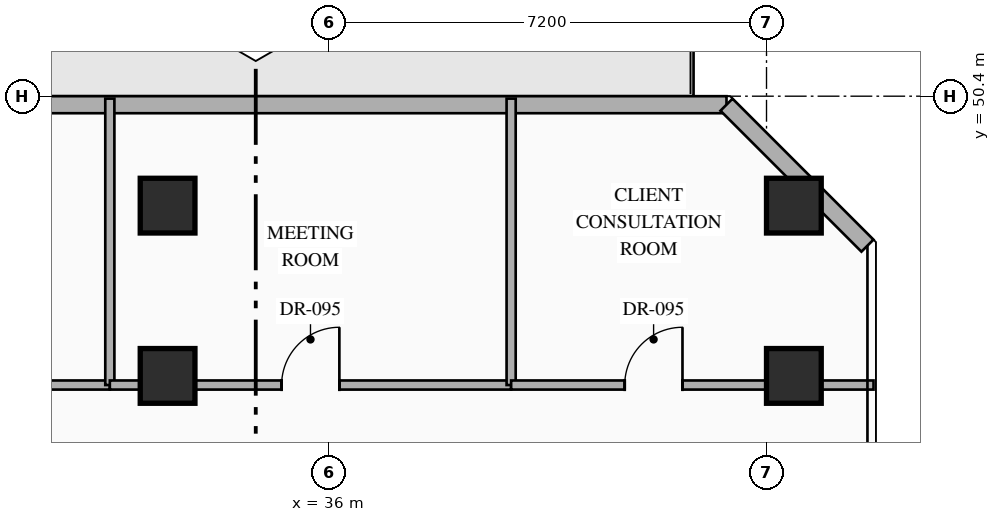
"""IFC4 building model, lengths in metres.
Left out: names, types, materials, properties, quantities, classifications, styles, units other than length and angle.
Written with IfcOpenShell. Run it as: python <this file> out.ifc"""

import sys

from ifc_helpers import new_model, si_unit, direction, frame, frame_2d, origin, origin_2d, place, context, subcontext, project, spatial, rectangle, hollow_rectangle, extrude, element, fill, save


model = new_model("IFC4")
c1 = context("Model", 3, precision=1e-05, world=origin(), true_north=direction((0.0, 1.0)))
c2 = subcontext(c1, "Body", "Model", "MODEL_VIEW")
j1 = project(units=[si_unit("LENGTHUNIT", "METRE"), si_unit("PLANEANGLEUNIT", "RADIAN")], contexts=[c1])
p1 = place(None, origin())
s1 = spatial("IfcSite", under=j1, at=p1, CompositionType="ELEMENT")
p2 = place(p1, origin())
s2 = spatial("IfcBuilding", under=s1, at=p2, CompositionType="ELEMENT")
p3 = place(p2, frame((0.0, 0.0, 112.05)))
s3 = spatial("IfcBuildingStorey", under=s2, at=p3, CompositionType="ELEMENT", Elevation=112.05)
for number, where, z_axis, x_axis in (
    (1, (33.35, 45.8, 0.0), (0.0, 0.0, 1.0), (1.0, 0.0, 0.0)),
    (2, (43.65, 45.8, 0.0), (0.0, 0.0, 1.0), (1.0, 0.0, 0.0)),
    (3, (33.35, 48.6, 0.0), (0.0, 0.0, 1.0), (1.0, 0.0, 0.0)),
    (4, (43.65, 48.6, 0.0), (0.0, 0.0, 1.0), (1.0, 0.0, 0.0)),
):
    element("IfcColumn", number, at=place(p3, frame(where, z_axis=z_axis, x_axis=x_axis)), inside=s3, PredefinedType="COLUMN", context=c2, shape_type="SweptSolid", body=[
        extrude(hollow_rectangle(XDim=0.9, YDim=0.9, WallThickness=0.036, at=origin_2d()), origin(), (0.0, 0.0, 1.0), 3.6),
    ])
p4 = place(p3, frame((12.058, 50.26, 0.0), z_axis=(0.0, 0.0, 1.0), x_axis=(1.0, 0.0, 0.0)))
e5 = element("IfcWall", 5, at=p4, inside=s3, PredefinedType="STANDARD", context=c2, shape_type="SweptSolid", body=[
    extrude(rectangle(XDim=30.484, YDim=0.28, at=frame_2d((15.242, 0.0))), origin(), (0.0, 0.0, 1.0), 3.35),
])
p5 = place(p4, frame((10.424, 0.0, 0.0)))
e6 = element("IfcOpeningElement", 6, at=p5, cuts=e5, PredefinedType="OPENING", context=c2, shape_type="SweptSolid", body=[
    extrude(rectangle(XDim=1.1, YDim=2.2, at=frame_2d((0.55, 1.1))), frame((0.0, 0.15, 0.0), z_axis=(0.0, -1.0, 0.0), x_axis=(1.0, 0.0, 0.0)), (0.0, 0.0, 1.0), 0.3),
])
p6 = place(p3, frame((42.542, 50.26, 0.0), z_axis=(0.0, 0.0, 1.0), x_axis=(0.707106781187, -0.707106781187, 0.0)))
e7 = element("IfcWall", 7, at=p6, inside=s3, PredefinedType="STANDARD", context=c2, shape_type="SweptSolid", body=[
    extrude(rectangle(XDim=3.278, YDim=0.28, at=frame_2d((1.639, 0.0))), origin(), (0.0, 0.0, 1.0), 3.35),
])
p7 = place(p3, frame((26.2, 45.65, 0.0), z_axis=(0.0, 0.0, 1.0), x_axis=(1.0, 0.0, 0.0)))
e8 = element("IfcWall", 8, at=p7, inside=s3, PredefinedType="PARTITIONING", context=c2, shape_type="SweptSolid", body=[
    extrude(rectangle(XDim=6.2, YDim=0.15, at=frame_2d((3.1, 0.0))), origin(), (0.0, 0.0, 1.0), 2.695),
])
p8 = place(p7, frame((2.625, 0.0, 0.0)))
e9 = element("IfcOpeningElement", 9, at=p8, cuts=e8, PredefinedType="OPENING", context=c2, shape_type="SweptSolid", body=[
    extrude(rectangle(XDim=0.95, YDim=2.15, at=frame_2d((0.475, 1.075))), frame((0.0, 0.085, 0.0), z_axis=(0.0, -1.0, 0.0), x_axis=(1.0, 0.0, 0.0)), (0.0, 0.0, 1.0), 0.17),
])
p9 = place(p3, frame((32.4, 45.65, 0.0), z_axis=(0.0, 0.0, 1.0), x_axis=(0.0, 1.0, 0.0)))
e10 = element("IfcWall", 10, at=p9, inside=s3, PredefinedType="PARTITIONING", context=c2, shape_type="SweptSolid", body=[
    extrude(rectangle(XDim=4.71, YDim=0.15, at=frame_2d((2.355, 0.0))), origin(), (0.0, 0.0, 1.0), 3.35),
])
p10 = place(p3, frame((32.4, 45.65, 0.0), z_axis=(0.0, 0.0, 1.0), x_axis=(1.0, 0.0, 0.0)))
e11 = element("IfcWall", 11, at=p10, inside=s3, PredefinedType="PARTITIONING", context=c2, shape_type="SweptSolid", body=[
    extrude(rectangle(XDim=6.6, YDim=0.15, at=frame_2d((3.3, 0.0))), origin(), (0.0, 0.0, 1.0), 2.695),
])
p11 = place(p10, frame((2.825, 0.0, 0.0)))
e12 = element("IfcOpeningElement", 12, at=p11, cuts=e11, PredefinedType="OPENING", context=c2, shape_type="SweptSolid", body=[
    extrude(rectangle(XDim=0.95, YDim=2.15, at=frame_2d((0.475, 1.075))), frame((0.0, 0.085, 0.0), z_axis=(0.0, -1.0, 0.0), x_axis=(1.0, 0.0, 0.0)), (0.0, 0.0, 1.0), 0.17),
])
p12 = place(p3, frame((39.0, 45.65, 0.0), z_axis=(0.0, 0.0, 1.0), x_axis=(0.0, 1.0, 0.0)))
e13 = element("IfcWall", 13, at=p12, inside=s3, PredefinedType="PARTITIONING", context=c2, shape_type="SweptSolid", body=[
    extrude(rectangle(XDim=4.71, YDim=0.15, at=frame_2d((2.355, 0.0))), origin(), (0.0, 0.0, 1.0), 3.35),
])
p13 = place(p3, frame((39.0, 45.65, 0.0), z_axis=(0.0, 0.0, 1.0), x_axis=(1.0, 0.0, 0.0)))
e14 = element("IfcWall", 14, at=p13, inside=s3, PredefinedType="PARTITIONING", context=c2, shape_type="SweptSolid", body=[
    extrude(rectangle(XDim=5.96, YDim=0.15, at=frame_2d((2.98, 0.0))), origin(), (0.0, 0.0, 1.0), 2.695),
])
p14 = place(p13, frame((1.868, 0.0, 0.0)))
e15 = element("IfcOpeningElement", 15, at=p14, cuts=e14, PredefinedType="OPENING", context=c2, shape_type="SweptSolid", body=[
    extrude(rectangle(XDim=0.95, YDim=2.15, at=frame_2d((0.475, 1.075))), frame((0.0, 0.085, 0.0), z_axis=(0.0, -1.0, 0.0), x_axis=(1.0, 0.0, 0.0)), (0.0, 0.0, 1.0), 0.17),
])
p15 = place(p11, origin())
e16 = element("IfcDoor", 16, at=p15, inside=s3, OperationType="SINGLE_SWING_RIGHT", PredefinedType="DOOR", context=c2, shape_type="SweptSolid", body=[
    extrude(rectangle(XDim=0.95, YDim=2.15, at=frame_2d((0.475, 1.075))), frame((0.0, 0.025, 0.0), z_axis=(0.0, -1.0, 0.0), x_axis=(1.0, 0.0, 0.0)), (0.0, 0.0, 1.0), 0.05),
])
fill(e12, e16)
p16 = place(p14, origin())
e17 = element("IfcDoor", 17, at=p16, inside=s3, OperationType="SINGLE_SWING_RIGHT", PredefinedType="DOOR", context=c2, shape_type="SweptSolid", body=[
    extrude(rectangle(XDim=0.95, YDim=2.15, at=frame_2d((0.475, 1.075))), frame((0.0, 0.025, 0.0), z_axis=(0.0, -1.0, 0.0), x_axis=(1.0, 0.0, 0.0)), (0.0, 0.0, 1.0), 0.05),
])
fill(e15, e17)
save(model, sys.argv[1])
